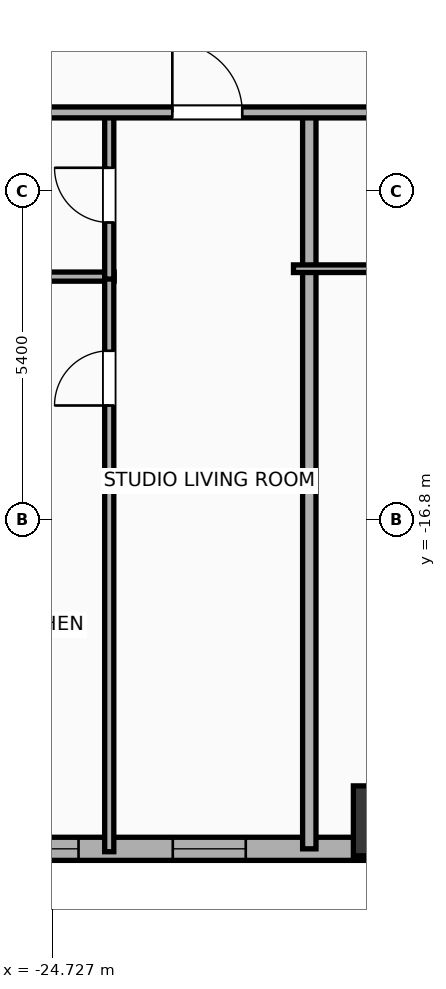
"""IFC4 building model, lengths in metres.
Left out: names, types, materials, properties, quantities, classifications, styles, units other than length and angle.
Written with IfcOpenShell. Run it as: python <this file> out.ifc"""

import sys

from ifc_helpers import new_model, si_unit, direction, frame, frame_2d, origin, origin_2d, place, context, subcontext, project, spatial, rectangle, hollow_rectangle, extrude, element, fill, save


model = new_model("IFC4")
c1 = context("Model", 3, precision=1e-05, world=origin(), true_north=direction((0.0, 1.0)))
c2 = subcontext(c1, "Body", "Model", "MODEL_VIEW")
j1 = project(units=[si_unit("LENGTHUNIT", "METRE"), si_unit("PLANEANGLEUNIT", "RADIAN")], contexts=[c1])
p1 = place(None, origin())
s1 = spatial("IfcSite", under=j1, at=p1, CompositionType="ELEMENT")
p2 = place(p1, origin())
s2 = spatial("IfcBuilding", under=s1, at=p2, CompositionType="ELEMENT")
p3 = place(p2, frame((0.0, 0.0, 33.8)))
s3 = spatial("IfcBuildingStorey", under=s2, at=p3, CompositionType="ELEMENT", Elevation=33.8)
p4 = place(p3, frame((-19.2, -21.75, 0.0), z_axis=(0.0, 0.0, 1.0), x_axis=(1.0, 0.0, 0.0)))
e1 = element("IfcColumn", 1, at=p4, inside=s3, PredefinedType="COLUMN", context=c2, shape_type="SweptSolid", body=[
    extrude(hollow_rectangle(XDim=1.15, YDim=1.15, WallThickness=0.04, at=origin_2d()), origin(), (0.0, 0.0, 1.0), 3.9),
])
p5 = place(p3, frame((22.381, -22.21, 0.0), z_axis=(0.0, 0.0, 1.0), x_axis=(-1.0, 0.0, 0.0)))
e2 = element("IfcWall", 2, at=p5, inside=s3, PredefinedType="ELEMENTEDWALL", context=c2, shape_type="SweptSolid", body=[
    extrude(rectangle(XDim=51.963, YDim=0.38, at=frame_2d((25.981, 0.0))), origin(), (0.0, 0.0, 1.0), 3.65),
])
p6 = place(p5, frame((49.127, 0.0, 0.75)))
e3 = element("IfcOpeningElement", 3, at=p6, cuts=e2, PredefinedType="OPENING", context=c2, shape_type="SweptSolid", body=[
    extrude(rectangle(XDim=1.2, YDim=2.05, at=frame_2d((0.6, 1.025))), frame((0.0, 0.2, 0.0), z_axis=(0.0, -1.0, 0.0), x_axis=(1.0, 0.0, 0.0)), (0.0, 0.0, 1.0), 0.4),
])
p7 = place(p5, frame((43.926, 0.0, 0.75)))
e4 = element("IfcOpeningElement", 4, at=p7, cuts=e2, PredefinedType="OPENING", context=c2, shape_type="SweptSolid", body=[
    extrude(rectangle(XDim=1.2, YDim=2.05, at=frame_2d((0.6, 1.025))), frame((0.0, 0.2, 0.0), z_axis=(0.0, -1.0, 0.0), x_axis=(1.0, 0.0, 0.0)), (0.0, 0.0, 1.0), 0.4),
])
p8 = place(p5, frame((46.676, 0.0, 0.75)))
e5 = element("IfcOpeningElement", 5, at=p8, cuts=e2, PredefinedType="OPENING", context=c2, shape_type="SweptSolid", body=[
    extrude(rectangle(XDim=1.2, YDim=2.05, at=frame_2d((0.6, 1.025))), frame((0.0, 0.2, 0.0), z_axis=(0.0, -1.0, 0.0), x_axis=(1.0, 0.0, 0.0)), (0.0, 0.0, 1.0), 0.4),
])
p9 = place(p5, frame((39.531, 0.0, 0.75)))
e6 = element("IfcOpeningElement", 6, at=p9, cuts=e2, PredefinedType="OPENING", context=c2, shape_type="SweptSolid", body=[
    extrude(rectangle(XDim=1.2, YDim=2.05, at=frame_2d((0.6, 1.025))), frame((0.0, 0.2, 0.0), z_axis=(0.0, -1.0, 0.0), x_axis=(1.0, 0.0, 0.0)), (0.0, 0.0, 1.0), 0.4),
])
p10 = place(p5, frame((32.926, 0.0, 0.75)))
e7 = element("IfcOpeningElement", 7, at=p10, cuts=e2, PredefinedType="OPENING", context=c2, shape_type="SweptSolid", body=[
    extrude(rectangle(XDim=1.2, YDim=2.05, at=frame_2d((0.6, 1.025))), frame((0.0, 0.2, 0.0), z_axis=(0.0, -1.0, 0.0), x_axis=(1.0, 0.0, 0.0)), (0.0, 0.0, 1.0), 0.4),
])
p11 = place(p5, frame((35.676, 0.0, 0.75)))
e8 = element("IfcOpeningElement", 8, at=p11, cuts=e2, PredefinedType="OPENING", context=c2, shape_type="SweptSolid", body=[
    extrude(rectangle(XDim=1.2, YDim=2.05, at=frame_2d((0.6, 1.025))), frame((0.0, 0.2, 0.0), z_axis=(0.0, -1.0, 0.0), x_axis=(1.0, 0.0, 0.0)), (0.0, 0.0, 1.0), 0.4),
])
p12 = place(p5, frame((28.531, 0.0, 0.75)))
e9 = element("IfcOpeningElement", 9, at=p12, cuts=e2, PredefinedType="OPENING", context=c2, shape_type="SweptSolid", body=[
    extrude(rectangle(XDim=1.2, YDim=2.05, at=frame_2d((0.6, 1.025))), frame((0.0, 0.2, 0.0), z_axis=(0.0, -1.0, 0.0), x_axis=(1.0, 0.0, 0.0)), (0.0, 0.0, 1.0), 0.4),
])
p13 = place(p5, frame((21.926, 0.0, 0.75)))
e10 = element("IfcOpeningElement", 10, at=p13, cuts=e2, PredefinedType="OPENING", context=c2, shape_type="SweptSolid", body=[
    extrude(rectangle(XDim=1.2, YDim=2.05, at=frame_2d((0.6, 1.025))), frame((0.0, 0.2, 0.0), z_axis=(0.0, -1.0, 0.0), x_axis=(1.0, 0.0, 0.0)), (0.0, 0.0, 1.0), 0.4),
])
p14 = place(p5, frame((24.676, 0.0, 0.75)))
e11 = element("IfcOpeningElement", 11, at=p14, cuts=e2, PredefinedType="OPENING", context=c2, shape_type="SweptSolid", body=[
    extrude(rectangle(XDim=1.2, YDim=2.05, at=frame_2d((0.6, 1.025))), frame((0.0, 0.2, 0.0), z_axis=(0.0, -1.0, 0.0), x_axis=(1.0, 0.0, 0.0)), (0.0, 0.0, 1.0), 0.4),
])
p15 = place(p5, frame((18.636, 0.0, 0.75)))
e12 = element("IfcOpeningElement", 12, at=p15, cuts=e2, PredefinedType="OPENING", context=c2, shape_type="SweptSolid", body=[
    extrude(rectangle(XDim=1.2, YDim=2.05, at=frame_2d((0.6, 1.025))), frame((0.0, 0.2, 0.0), z_axis=(0.0, -1.0, 0.0), x_axis=(1.0, 0.0, 0.0)), (0.0, 0.0, 1.0), 0.4),
])
p16 = place(p5, frame((15.886, 0.0, 0.75)))
e13 = element("IfcOpeningElement", 13, at=p16, cuts=e2, PredefinedType="OPENING", context=c2, shape_type="SweptSolid", body=[
    extrude(rectangle(XDim=1.2, YDim=2.05, at=frame_2d((0.6, 1.025))), frame((0.0, 0.2, 0.0), z_axis=(0.0, -1.0, 0.0), x_axis=(1.0, 0.0, 0.0)), (0.0, 0.0, 1.0), 0.4),
])
p17 = place(p5, frame((12.031, 0.0, 0.75)))
e14 = element("IfcOpeningElement", 14, at=p17, cuts=e2, PredefinedType="OPENING", context=c2, shape_type="SweptSolid", body=[
    extrude(rectangle(XDim=1.2, YDim=2.05, at=frame_2d((0.6, 1.025))), frame((0.0, 0.2, 0.0), z_axis=(0.0, -1.0, 0.0), x_axis=(1.0, 0.0, 0.0)), (0.0, 0.0, 1.0), 0.4),
])
p18 = place(p5, frame((7.636, 0.0, 0.75)))
e15 = element("IfcOpeningElement", 15, at=p18, cuts=e2, PredefinedType="OPENING", context=c2, shape_type="SweptSolid", body=[
    extrude(rectangle(XDim=1.2, YDim=2.05, at=frame_2d((0.6, 1.025))), frame((0.0, 0.2, 0.0), z_axis=(0.0, -1.0, 0.0), x_axis=(1.0, 0.0, 0.0)), (0.0, 0.0, 1.0), 0.4),
])
p19 = place(p5, frame((4.886, 0.0, 0.75)))
e16 = element("IfcOpeningElement", 16, at=p19, cuts=e2, PredefinedType="OPENING", context=c2, shape_type="SweptSolid", body=[
    extrude(rectangle(XDim=1.2, YDim=2.05, at=frame_2d((0.6, 1.025))), frame((0.0, 0.2, 0.0), z_axis=(0.0, -1.0, 0.0), x_axis=(1.0, 0.0, 0.0)), (0.0, 0.0, 1.0), 0.4),
])
p20 = place(p5, frame((2.036, 0.0, 0.75)))
e17 = element("IfcOpeningElement", 17, at=p20, cuts=e2, PredefinedType="OPENING", context=c2, shape_type="SweptSolid", body=[
    extrude(rectangle(XDim=1.2, YDim=2.05, at=frame_2d((0.6, 1.025))), frame((0.0, 0.2, 0.0), z_axis=(0.0, -1.0, 0.0), x_axis=(1.0, 0.0, 0.0)), (0.0, 0.0, 1.0), 0.4),
])
p21 = place(p3, frame((-26.26, -12.8, 0.0), z_axis=(0.0, 0.0, 1.0), x_axis=(1.0, 0.0, 0.0)))
e18 = element("IfcWall", 18, at=p21, inside=s3, PredefinedType="PLUMBINGWALL", context=c2, shape_type="SweptSolid", body=[
    extrude(rectangle(XDim=2.55, YDim=0.15, at=frame_2d((1.275, 0.0))), origin(), (0.0, 0.0, 1.0), 3.65),
])
p22 = place(p3, frame((-23.79, -22.258, 0.0), z_axis=(0.0, 0.0, 1.0), x_axis=(0.0, 1.0, 0.0)))
e19 = element("IfcWall", 19, at=p22, inside=s3, PredefinedType="PLUMBINGWALL", context=c2, shape_type="SweptSolid", body=[
    extrude(rectangle(XDim=9.498, YDim=0.15, at=frame_2d((4.749, 0.0))), origin(), (0.0, 0.0, 1.0), 3.65),
])
p23 = place(p22, frame((7.338, 0.0, 0.0)))
e20 = element("IfcOpeningElement", 20, at=p23, cuts=e19, PredefinedType="OPENING", context=c2, shape_type="SweptSolid", body=[
    extrude(rectangle(XDim=0.9, YDim=2.05, at=frame_2d((0.45, 1.025))), frame((0.0, 0.085, 0.0), z_axis=(0.0, -1.0, 0.0), x_axis=(1.0, 0.0, 0.0)), (0.0, 0.0, 1.0), 0.17),
])
p24 = place(p3, frame((-23.79, -12.84, 0.0), z_axis=(0.0, 0.0, 1.0), x_axis=(0.0, 1.0, 0.0)))
e21 = element("IfcWall", 21, at=p24, inside=s3, PredefinedType="PLUMBINGWALL", context=c2, shape_type="SweptSolid", body=[
    extrude(rectangle(XDim=2.76, YDim=0.15, at=frame_2d((1.38, 0.0))), origin(), (0.0, 0.0, 1.0), 3.65),
])
p25 = place(p24, frame((0.93, 0.0, 0.0)))
e22 = element("IfcOpeningElement", 22, at=p25, cuts=e21, PredefinedType="OPENING", context=c2, shape_type="SweptSolid", body=[
    extrude(rectangle(XDim=0.9, YDim=2.05, at=frame_2d((0.45, 1.025))), frame((0.0, 0.085, 0.0), z_axis=(0.0, -1.0, 0.0), x_axis=(1.0, 0.0, 0.0)), (0.0, 0.0, 1.0), 0.17),
])
p26 = place(p3, frame((-20.5, -22.21, 0.0), z_axis=(0.0, 0.0, 1.0), x_axis=(0.0, 1.0, 0.0)))
e23 = element("IfcWall", 23, at=p26, inside=s3, PredefinedType="PARTITIONING", context=c2, shape_type="SweptSolid", body=[
    extrude(rectangle(XDim=12.19, YDim=0.22, at=frame_2d((6.095, 0.0))), origin(), (0.0, 0.0, 1.0), 3.65),
])
p27 = place(p3, frame((-20.76, -12.67, 0.0), z_axis=(0.0, 0.0, 1.0), x_axis=(1.0, 0.0, 0.0)))
e24 = element("IfcWall", 24, at=p27, inside=s3, PredefinedType="PARTITIONING", context=c2, shape_type="SweptSolid", body=[
    extrude(rectangle(XDim=2.63, YDim=0.125, at=frame_2d((1.315, 0.0))), origin(), (0.0, 0.0, 1.0), 3.65),
])
p28 = place(p3, frame((-33.41, -10.1, 0.0), z_axis=(0.0, 0.0, 1.0), x_axis=(1.0, 0.0, 0.0)))
e25 = element("IfcWall", 25, at=p28, inside=s3, PredefinedType="PARTITIONING", context=c2, shape_type="SweptSolid", body=[
    extrude(rectangle(XDim=59.62, YDim=0.18, at=frame_2d((29.81, 0.0))), origin(), (0.0, 0.0, 1.0), 3.65),
])
p29 = place(p28, frame((3.259, 0.0, 0.0)))
e26 = element("IfcOpeningElement", 26, at=p29, cuts=e25, PredefinedType="OPENING", context=c2, shape_type="SweptSolid", body=[
    extrude(rectangle(XDim=1.15, YDim=2.05, at=frame_2d((0.575, 1.025))), frame((0.0, 0.1, 0.0), z_axis=(0.0, -1.0, 0.0), x_axis=(1.0, 0.0, 0.0)), (0.0, 0.0, 1.0), 0.2),
])
p30 = place(p28, frame((10.657, 0.0, 0.0)))
e27 = element("IfcOpeningElement", 27, at=p30, cuts=e25, PredefinedType="OPENING", context=c2, shape_type="SweptSolid", body=[
    extrude(rectangle(XDim=1.15, YDim=2.05, at=frame_2d((0.575, 1.025))), frame((0.0, 0.1, 0.0), z_axis=(0.0, -1.0, 0.0), x_axis=(1.0, 0.0, 0.0)), (0.0, 0.0, 1.0), 0.2),
])
p31 = place(p28, frame((15.421, 0.0, 0.0)))
e28 = element("IfcOpeningElement", 28, at=p31, cuts=e25, PredefinedType="OPENING", context=c2, shape_type="SweptSolid", body=[
    extrude(rectangle(XDim=0.9, YDim=2.05, at=frame_2d((0.45, 1.025))), frame((0.0, 0.1, 0.0), z_axis=(0.0, -1.0, 0.0), x_axis=(1.0, 0.0, 0.0)), (0.0, 0.0, 1.0), 0.2),
])
p32 = place(p28, frame((21.657, 0.0, 0.0)))
e29 = element("IfcOpeningElement", 29, at=p32, cuts=e25, PredefinedType="OPENING", context=c2, shape_type="SweptSolid", body=[
    extrude(rectangle(XDim=1.15, YDim=2.05, at=frame_2d((0.575, 1.025))), frame((0.0, 0.1, 0.0), z_axis=(0.0, -1.0, 0.0), x_axis=(1.0, 0.0, 0.0)), (0.0, 0.0, 1.0), 0.2),
])
p33 = place(p28, frame((26.421, 0.0, 0.0)))
e30 = element("IfcOpeningElement", 30, at=p33, cuts=e25, PredefinedType="OPENING", context=c2, shape_type="SweptSolid", body=[
    extrude(rectangle(XDim=0.9, YDim=2.05, at=frame_2d((0.45, 1.025))), frame((0.0, 0.1, 0.0), z_axis=(0.0, -1.0, 0.0), x_axis=(1.0, 0.0, 0.0)), (0.0, 0.0, 1.0), 0.2),
])
p34 = place(p28, frame((32.657, 0.0, 0.0)))
e31 = element("IfcOpeningElement", 31, at=p34, cuts=e25, PredefinedType="OPENING", context=c2, shape_type="SweptSolid", body=[
    extrude(rectangle(XDim=1.15, YDim=2.05, at=frame_2d((0.575, 1.025))), frame((0.0, 0.1, 0.0), z_axis=(0.0, -1.0, 0.0), x_axis=(1.0, 0.0, 0.0)), (0.0, 0.0, 1.0), 0.2),
])
p35 = place(p28, frame((36.008, 0.0, 0.0)))
e32 = element("IfcOpeningElement", 32, at=p35, cuts=e25, PredefinedType="OPENING", context=c2, shape_type="SweptSolid", body=[
    extrude(rectangle(XDim=1.15, YDim=2.05, at=frame_2d((0.575, 1.025))), frame((0.0, 0.1, 0.0), z_axis=(0.0, -1.0, 0.0), x_axis=(1.0, 0.0, 0.0)), (0.0, 0.0, 1.0), 0.2),
])
p36 = place(p28, frame((42.917, 0.0, 0.0)))
e33 = element("IfcOpeningElement", 33, at=p36, cuts=e25, PredefinedType="OPENING", context=c2, shape_type="SweptSolid", body=[
    extrude(rectangle(XDim=0.9, YDim=2.05, at=frame_2d((0.45, 1.025))), frame((0.0, 0.1, 0.0), z_axis=(0.0, -1.0, 0.0), x_axis=(1.0, 0.0, 0.0)), (0.0, 0.0, 1.0), 0.2),
])
p37 = place(p28, frame((47.008, 0.0, 0.0)))
e34 = element("IfcOpeningElement", 34, at=p37, cuts=e25, PredefinedType="OPENING", context=c2, shape_type="SweptSolid", body=[
    extrude(rectangle(XDim=1.15, YDim=2.05, at=frame_2d((0.575, 1.025))), frame((0.0, 0.1, 0.0), z_axis=(0.0, -1.0, 0.0), x_axis=(1.0, 0.0, 0.0)), (0.0, 0.0, 1.0), 0.2),
])
p38 = place(p28, frame((55.14, 0.0, 0.0)))
e35 = element("IfcOpeningElement", 35, at=p38, cuts=e25, PredefinedType="OPENING", context=c2, shape_type="SweptSolid", body=[
    extrude(rectangle(XDim=1.15, YDim=2.05, at=frame_2d((0.575, 1.025))), frame((0.0, 0.1, 0.0), z_axis=(0.0, -1.0, 0.0), x_axis=(1.0, 0.0, 0.0)), (0.0, 0.0, 1.0), 0.2),
])
p39 = place(p7, origin())
e36 = element("IfcWindow", 36, at=p39, inside=s3, PartitioningType="SINGLE_PANEL", PredefinedType="WINDOW", context=c2, shape_type="SweptSolid", body=[
    extrude(rectangle(XDim=1.2, YDim=2.05, at=frame_2d((0.6, 1.025))), frame((0.0, 0.03, 0.0), z_axis=(0.0, -1.0, 0.0), x_axis=(1.0, 0.0, 0.0)), (0.0, 0.0, 1.0), 0.06),
])
fill(e4, e36)
p40 = place(p8, origin())
e37 = element("IfcWindow", 37, at=p40, inside=s3, PartitioningType="SINGLE_PANEL", PredefinedType="WINDOW", context=c2, shape_type="SweptSolid", body=[
    extrude(rectangle(XDim=1.2, YDim=2.05, at=frame_2d((0.6, 1.025))), frame((0.0, 0.03, 0.0), z_axis=(0.0, -1.0, 0.0), x_axis=(1.0, 0.0, 0.0)), (0.0, 0.0, 1.0), 0.06),
])
fill(e5, e37)
p41 = place(p23, origin())
e38 = element("IfcDoor", 38, at=p41, inside=s3, OperationType="SINGLE_SWING_LEFT", PredefinedType="DOOR", context=c2, shape_type="SweptSolid", body=[
    extrude(rectangle(XDim=0.9, YDim=2.05, at=frame_2d((0.45, 1.025))), frame((0.0, 0.025, 0.0), z_axis=(0.0, -1.0, 0.0), x_axis=(1.0, 0.0, 0.0)), (0.0, 0.0, 1.0), 0.05),
])
fill(e20, e38)
p42 = place(p25, origin())
e39 = element("IfcDoor", 39, at=p42, inside=s3, OperationType="SINGLE_SWING_RIGHT", PredefinedType="DOOR", context=c2, shape_type="SweptSolid", body=[
    extrude(rectangle(XDim=0.9, YDim=2.05, at=frame_2d((0.45, 1.025))), frame((0.0, 0.025, 0.0), z_axis=(0.0, -1.0, 0.0), x_axis=(1.0, 0.0, 0.0)), (0.0, 0.0, 1.0), 0.05),
])
fill(e22, e39)
p43 = place(p30, origin())
e40 = element("IfcDoor", 40, at=p43, inside=s3, OperationType="SINGLE_SWING_LEFT", PredefinedType="DOOR", context=c2, shape_type="SweptSolid", body=[
    extrude(rectangle(XDim=1.15, YDim=2.05, at=frame_2d((0.575, 1.025))), frame((0.0, 0.025, 0.0), z_axis=(0.0, -1.0, 0.0), x_axis=(1.0, 0.0, 0.0)), (0.0, 0.0, 1.0), 0.05),
])
fill(e27, e40)
save(model, sys.argv[1])
